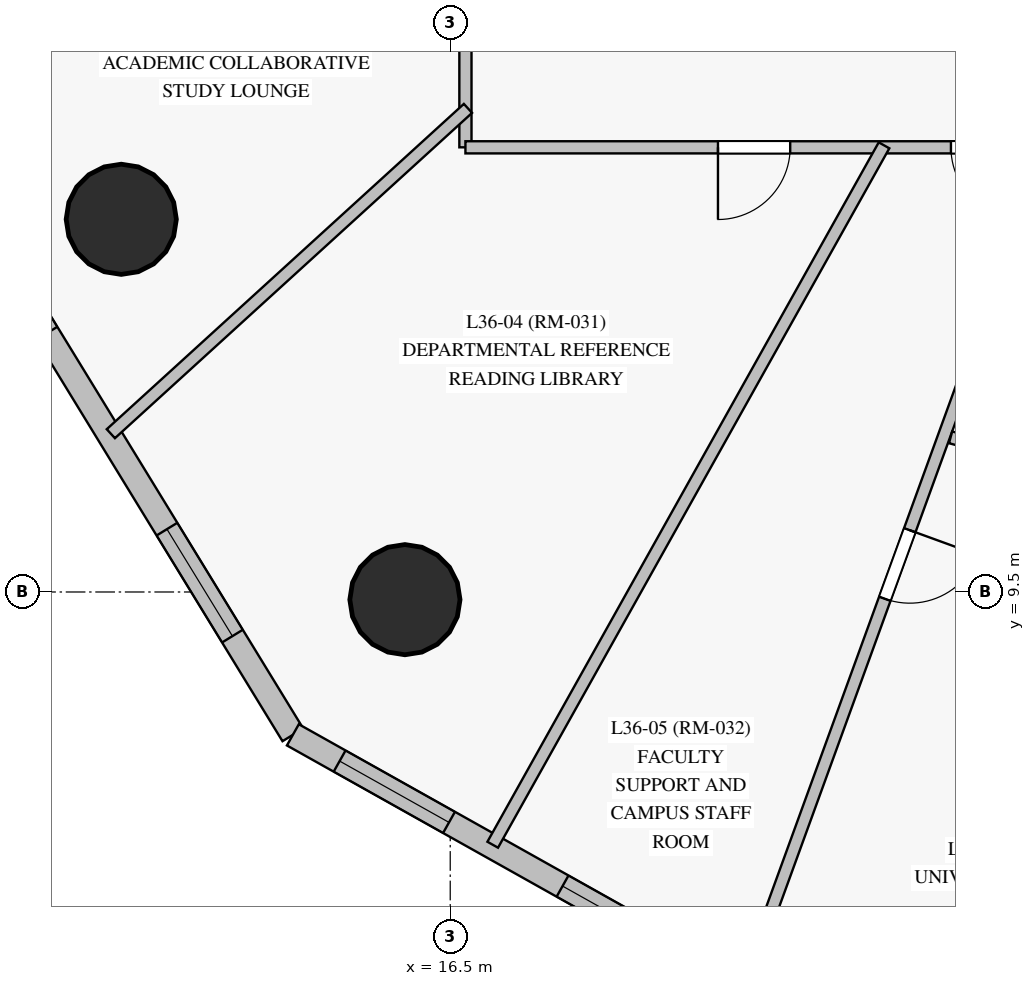
"""IFC4 building model, lengths in metres.
Left out: names, types, materials, properties, quantities, classifications, styles, units other than length and angle.
Written with IfcOpenShell. Run it as: python <this file> out.ifc"""

import sys

from ifc_helpers import new_model, si_unit, direction, frame, frame_2d, origin, origin_with_axes, origin_2d, place, context, subcontext, project, spatial, rectangle, circle, extrude, source, transform, mapped, element, fill, save


model = new_model("IFC4")
c1 = context("Model", 3, precision=1e-05, world=origin(), true_north=direction((0.0, 1.0)))
c2 = subcontext(c1, "Body", "Model", "MODEL_VIEW")
j1 = project(units=[si_unit("LENGTHUNIT", "METRE"), si_unit("PLANEANGLEUNIT", "RADIAN")], contexts=[c1])
p1 = place(None, origin())
s1 = spatial("IfcSite", under=j1, at=p1, CompositionType="ELEMENT")
p2 = place(p1, origin())
s2 = spatial("IfcBuilding", under=s1, at=p2, CompositionType="ELEMENT")
p3 = place(p2, frame((0.0, 0.0, 129.75)))
s3 = spatial("IfcBuildingStorey", under=s2, at=p3, CompositionType="ELEMENT", Elevation=129.75)
m1 = source(origin_with_axes(), c2, "Body", "SweptSolid", [
    extrude(circle(Radius=0.725, at=origin_2d()), origin(), (0.0, 0.0, 1.0), 3.05),
])
for number, where, z_axis, x_axis in (
    (1, (12.172, 14.403, 0.0), (0.0, 0.0, 1.0), (1.0, 0.0, 0.0)),
    (2, (15.904, 9.399, 0.0), (0.0, 0.0, 1.0), (1.0, 0.0, 0.0)),
):
    element("IfcColumn", number, at=place(p3, frame(where, z_axis=z_axis, x_axis=x_axis)), inside=s3, PredefinedType="COLUMN", context=c2, shape_type="MappedRepresentation", body=[
        mapped(m1, transform((0.0, 0.0, 0.0), scale=1.0)),
    ])
p4 = place(p3, frame((9.487, 15.694, 0.0), z_axis=(0.0, 0.0, 1.0), x_axis=(0.522110215284, -0.852878023574, 0.0)))
e3 = element("IfcWall", 3, at=p4, inside=s3, PredefinedType="SOLIDWALL", context=c2, shape_type="SweptSolid", body=[
    extrude(rectangle(XDim=9.466, YDim=0.32, at=frame_2d((4.733, 0.0))), origin(), (0.0, 0.0, 1.0), 2.825),
])
p5 = place(p4, frame((1.62, 0.0, 0.85)))
e4 = element("IfcOpeningElement", 4, at=p5, cuts=e3, PredefinedType="OPENING", context=c2, shape_type="SweptSolid", body=[
    extrude(rectangle(XDim=1.65, YDim=1.65, at=frame_2d((0.825, 0.825))), frame((0.0, 0.17, 0.0), z_axis=(0.0, -1.0, 0.0), x_axis=(1.0, 0.0, 0.0)), (0.0, 0.0, 1.0), 0.34),
])
p6 = place(p4, frame((6.293, 0.0, 0.85)))
e5 = element("IfcOpeningElement", 5, at=p6, cuts=e3, PredefinedType="OPENING", context=c2, shape_type="SweptSolid", body=[
    extrude(rectangle(XDim=1.65, YDim=1.65, at=frame_2d((0.825, 0.825))), frame((0.0, 0.17, 0.0), z_axis=(0.0, -1.0, 0.0), x_axis=(1.0, 0.0, 0.0)), (0.0, 0.0, 1.0), 0.34),
])
p7 = place(p3, frame((14.43, 7.621, 0.0), z_axis=(0.0, 0.0, 1.0), x_axis=(0.872233474303, -0.489089732365, 0.0)))
e6 = element("IfcWall", 6, at=p7, inside=s3, PredefinedType="SOLIDWALL", context=c2, shape_type="SweptSolid", body=[
    extrude(rectangle(XDim=11.799, YDim=0.32, at=frame_2d((5.899, 0.0))), origin(), (0.0, 0.0, 1.0), 2.825),
])
p8 = place(p7, frame((0.705, 0.0, 0.85)))
e7 = element("IfcOpeningElement", 7, at=p8, cuts=e6, PredefinedType="OPENING", context=c2, shape_type="SweptSolid", body=[
    extrude(rectangle(XDim=1.65, YDim=1.65, at=frame_2d((0.825, 0.825))), frame((0.0, 0.17, 0.0), z_axis=(0.0, -1.0, 0.0), x_axis=(1.0, 0.0, 0.0)), (0.0, 0.0, 1.0), 0.34),
])
p9 = place(p7, frame((4.068, 0.0, 0.85)))
e8 = element("IfcOpeningElement", 8, at=p9, cuts=e6, PredefinedType="OPENING", context=c2, shape_type="SweptSolid", body=[
    extrude(rectangle(XDim=1.65, YDim=1.65, at=frame_2d((0.825, 0.825))), frame((0.0, 0.17, 0.0), z_axis=(0.0, -1.0, 0.0), x_axis=(1.0, 0.0, 0.0)), (0.0, 0.0, 1.0), 0.34),
])
p10 = place(p7, frame((8.437, 0.0, 0.85)))
e9 = element("IfcOpeningElement", 9, at=p10, cuts=e6, PredefinedType="OPENING", context=c2, shape_type="SweptSolid", body=[
    extrude(rectangle(XDim=1.65, YDim=1.65, at=frame_2d((0.825, 0.825))), frame((0.0, 0.17, 0.0), z_axis=(0.0, -1.0, 0.0), x_axis=(1.0, 0.0, 0.0)), (0.0, 0.0, 1.0), 0.34),
])
p11 = place(p3, frame((16.7, 15.35, 0.0), z_axis=(0.0, 0.0, 1.0), x_axis=(0.0, 1.0, 0.0)))
e10 = element("IfcWall", 10, at=p11, inside=s3, PredefinedType="PARTITIONING", context=c2, shape_type="SweptSolid", body=[
    extrude(rectangle(XDim=22.3, YDim=0.16, at=frame_2d((11.15, 0.0))), origin(), (0.0, 0.0, 1.0), 2.225),
])
p12 = place(p11, frame((10.675, 0.0, 0.0)))
e11 = element("IfcOpeningElement", 11, at=p12, cuts=e10, PredefinedType="OPENING", context=c2, shape_type="SweptSolid", body=[
    extrude(rectangle(XDim=0.95, YDim=2.15, at=frame_2d((0.475, 1.075))), frame((0.0, 0.09, 0.0), z_axis=(0.0, -1.0, 0.0), x_axis=(1.0, 0.0, 0.0)), (0.0, 0.0, 1.0), 0.18),
])
p13 = place(p11, frame((2.159, 0.0, 0.0)))
e12 = element("IfcOpeningElement", 12, at=p13, cuts=e10, PredefinedType="OPENING", context=c2, shape_type="SweptSolid", body=[
    extrude(rectangle(XDim=0.95, YDim=2.15, at=frame_2d((0.475, 1.075))), frame((0.0, 0.09, 0.0), z_axis=(0.0, -1.0, 0.0), x_axis=(1.0, 0.0, 0.0)), (0.0, 0.0, 1.0), 0.18),
])
p14 = place(p11, frame((14.02, 0.0, 0.0)))
e13 = element("IfcOpeningElement", 13, at=p14, cuts=e10, PredefinedType="OPENING", context=c2, shape_type="SweptSolid", body=[
    extrude(rectangle(XDim=0.95, YDim=2.15, at=frame_2d((0.475, 1.075))), frame((0.0, 0.09, 0.0), z_axis=(0.0, -1.0, 0.0), x_axis=(1.0, 0.0, 0.0)), (0.0, 0.0, 1.0), 0.18),
])
p15 = place(p3, frame((24.389, 15.378, 0.0), z_axis=(0.0, 0.0, 1.0), x_axis=(-0.34195630746, -0.939715852685, 0.0)))
e14 = element("IfcWall", 14, at=p15, inside=s3, PredefinedType="PARTITIONING", context=c2, shape_type="SweptSolid", body=[
    extrude(rectangle(XDim=11.766, YDim=0.16, at=frame_2d((5.883, 0.0))), origin(), (0.0, 0.0, 1.0), 2.825),
])
p16 = place(p15, frame((5.39, 0.0, 0.0)))
e15 = element("IfcOpeningElement", 15, at=p16, cuts=e14, PredefinedType="OPENING", context=c2, shape_type="SweptSolid", body=[
    extrude(rectangle(XDim=0.96, YDim=2.15, at=frame_2d((0.48, 1.075))), frame((0.0, 0.09, 0.0), z_axis=(0.0, -1.0, 0.0), x_axis=(1.0, 0.0, 0.0)), (0.0, 0.0, 1.0), 0.18),
])
p17 = place(p3, frame((27.55, 15.35, 0.0), z_axis=(0.0, 0.0, 1.0), x_axis=(-1.0, 0.0, 0.0)))
e16 = element("IfcWall", 16, at=p17, inside=s3, PredefinedType="PARTITIONING", context=c2, shape_type="SweptSolid", body=[
    extrude(rectangle(XDim=10.85, YDim=0.16, at=frame_2d((5.425, 0.0))), origin(), (0.0, 0.0, 1.0), 2.325),
])
p18 = place(p17, frame((6.577, 0.0, 0.0)))
e17 = element("IfcOpeningElement", 17, at=p18, cuts=e16, PredefinedType="OPENING", context=c2, shape_type="SweptSolid", body=[
    extrude(rectangle(XDim=0.95, YDim=2.15, at=frame_2d((0.475, 1.075))), frame((0.0, 0.09, 0.0), z_axis=(0.0, -1.0, 0.0), x_axis=(1.0, 0.0, 0.0)), (0.0, 0.0, 1.0), 0.18),
])
p19 = place(p17, frame((3.512, 0.0, 0.0)))
e18 = element("IfcOpeningElement", 18, at=p19, cuts=e16, PredefinedType="OPENING", context=c2, shape_type="SweptSolid", body=[
    extrude(rectangle(XDim=0.95, YDim=2.15, at=frame_2d((0.475, 1.075))), frame((0.0, 0.09, 0.0), z_axis=(0.0, -1.0, 0.0), x_axis=(1.0, 0.0, 0.0)), (0.0, 0.0, 1.0), 0.18),
])
p20 = place(p17, frame((1.948, 0.0, 0.0)))
e19 = element("IfcOpeningElement", 19, at=p20, cuts=e16, PredefinedType="OPENING", context=c2, shape_type="SweptSolid", body=[
    extrude(rectangle(XDim=0.95, YDim=2.15, at=frame_2d((0.475, 1.075))), frame((0.0, 0.09, 0.0), z_axis=(0.0, -1.0, 0.0), x_axis=(1.0, 0.0, 0.0)), (0.0, 0.0, 1.0), 0.18),
])
p21 = place(p3, frame((22.207, 15.376, 0.0), z_axis=(0.0, 0.0, 1.0), x_axis=(-0.488271237189, -0.872691926704, 0.0)))
e20 = element("IfcWall", 20, at=p21, inside=s3, PredefinedType="PARTITIONING", context=c2, shape_type="SweptSolid", body=[
    extrude(rectangle(XDim=10.544, YDim=0.16, at=frame_2d((5.272, 0.0))), origin(), (0.0, 0.0, 1.0), 2.825),
])
p22 = place(p3, frame((16.733, 15.862, 0.0), z_axis=(0.0, 0.0, 1.0), x_axis=(-0.739260079392, -0.673420028673, 0.0)))
e21 = element("IfcWall", 21, at=p22, inside=s3, PredefinedType="PARTITIONING", context=c2, shape_type="SweptSolid", body=[
    extrude(rectangle(XDim=6.356, YDim=0.16, at=frame_2d((3.178, 0.0))), origin(), (0.0, 0.0, 1.0), 2.825),
])
p23 = place(p3, frame((13.942, 18.942, 0.0), z_axis=(0.0, 0.0, 1.0), x_axis=(-0.885820312937, -0.464028418514, 0.0)))
e22 = element("IfcWall", 22, at=p23, inside=s3, PredefinedType="PARTITIONING", context=c2, shape_type="SweptSolid", body=[
    extrude(rectangle(XDim=5.11, YDim=0.16, at=frame_2d((2.555, 0.0))), origin(), (0.0, 0.0, 1.0), 2.825),
])
p24 = place(p3, frame((27.579, 10.33, 0.0), z_axis=(0.0, 0.0, 1.0), x_axis=(-0.965933068413, 0.258792015614, 0.0)))
e23 = element("IfcWall", 23, at=p24, inside=s3, PredefinedType="PARTITIONING", context=c2, shape_type="SweptSolid", body=[
    extrude(rectangle(XDim=4.655, YDim=0.16, at=frame_2d((2.327, 0.0))), origin(), (0.0, 0.0, 1.0), 2.825),
])
m2 = source(origin_with_axes(), c2, "Body", "SweptSolid", [
    extrude(rectangle(XDim=1.65, YDim=1.65, at=frame_2d((0.825, 0.825))), frame((0.0, 0.03, 0.0), z_axis=(0.0, -1.0, 0.0), x_axis=(1.0, 0.0, 0.0)), (0.0, 0.0, 1.0), 0.06),
])
p25 = place(p6, origin())
e24 = element("IfcWindow", 24, at=p25, inside=s3, PartitioningType="SINGLE_PANEL", PredefinedType="WINDOW", context=c2, shape_type="MappedRepresentation", body=[
    mapped(m2, transform((0.0, 0.0, 0.0), scale=1.0)),
])
fill(e5, e24)
p26 = place(p8, origin())
e25 = element("IfcWindow", 25, at=p26, inside=s3, PartitioningType="SINGLE_PANEL", PredefinedType="WINDOW", context=c2, shape_type="MappedRepresentation", body=[
    mapped(m2, transform((0.0, 0.0, 0.0), scale=1.0)),
])
fill(e7, e25)
p27 = place(p9, origin())
e26 = element("IfcWindow", 26, at=p27, inside=s3, PartitioningType="SINGLE_PANEL", PredefinedType="WINDOW", context=c2, shape_type="MappedRepresentation", body=[
    mapped(m2, transform((0.0, 0.0, 0.0), scale=1.0)),
])
fill(e8, e26)
m3 = source(origin_with_axes(), c2, "Body", "SweptSolid", [
    extrude(rectangle(XDim=0.95, YDim=2.15, at=frame_2d((0.475, 1.075))), frame((0.0, 0.025, 0.0), z_axis=(0.0, -1.0, 0.0), x_axis=(1.0, 0.0, 0.0)), (0.0, 0.0, 1.0), 0.05),
])
p28 = place(p18, origin())
e27 = element("IfcDoor", 27, at=p28, inside=s3, OperationType="SINGLE_SWING_RIGHT", PredefinedType="DOOR", context=c2, shape_type="MappedRepresentation", body=[
    mapped(m3, transform((0.0, 0.0, 0.0), scale=1.0)),
])
fill(e17, e27)
p29 = place(p19, origin())
e28 = element("IfcDoor", 28, at=p29, inside=s3, OperationType="SINGLE_SWING_LEFT", PredefinedType="DOOR", context=c2, shape_type="MappedRepresentation", body=[
    mapped(m3, transform((0.0, 0.0, 0.0), scale=1.0)),
])
fill(e18, e28)
m4 = source(origin_with_axes(), c2, "Body", "SweptSolid", [
    extrude(rectangle(XDim=0.96, YDim=2.15, at=frame_2d((0.48, 1.075))), frame((0.0, 0.025, 0.0), z_axis=(0.0, -1.0, 0.0), x_axis=(1.0, 0.0, 0.0)), (0.0, 0.0, 1.0), 0.05),
])
p30 = place(p16, origin())
e29 = element("IfcDoor", 29, at=p30, inside=s3, OperationType="SINGLE_SWING_LEFT", PredefinedType="DOOR", context=c2, shape_type="MappedRepresentation", body=[
    mapped(m4, transform((0.0, 0.0, 0.0), scale=1.0)),
])
fill(e15, e29)
save(model, sys.argv[1])
